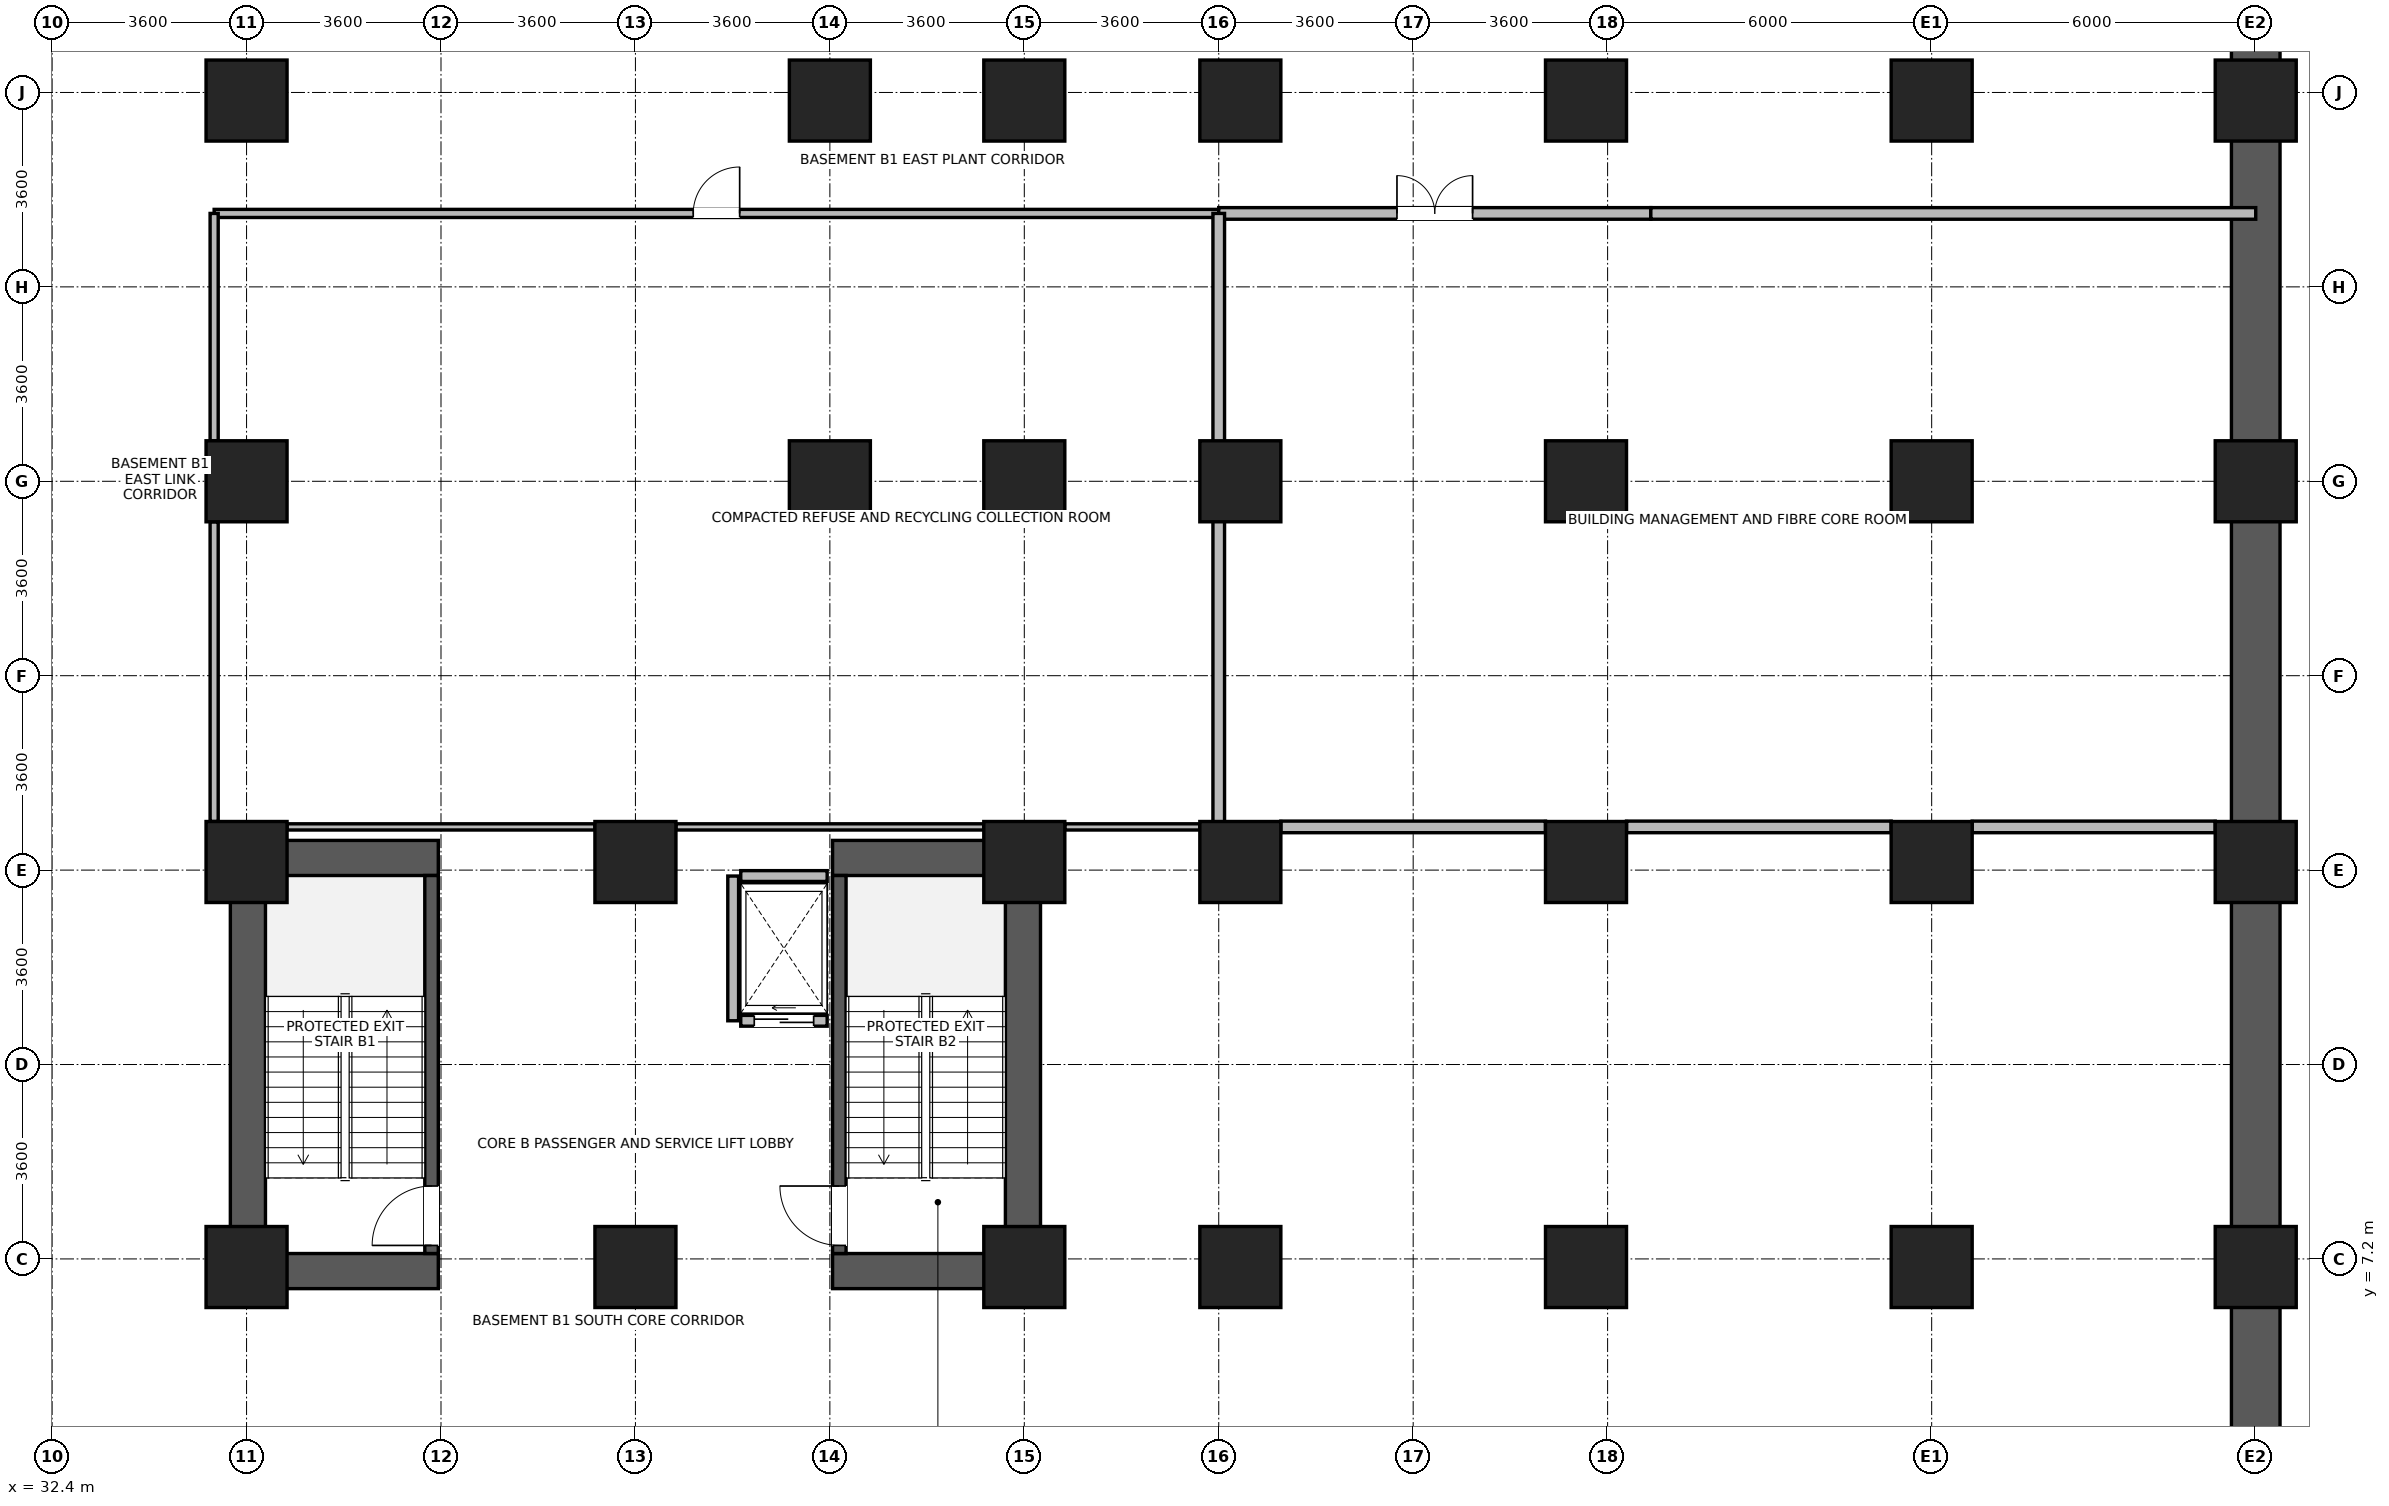
"""IFC4 building model, lengths in metres.
Left out: names, types, materials, properties, quantities, classifications, styles, units other than length and angle.
Written with IfcOpenShell. Run it as: python <this file> out.ifc"""

import sys

from ifc_helpers import new_model, si_unit, direction, frame, frame_2d, origin, origin_2d, place, context, subcontext, project, spatial, rectangle, extrude, source, transform, mapped, element, fill, save


model = new_model("IFC4")
c1 = context("Model", 3, precision=1e-05, world=origin(), true_north=direction((0.0, 1.0)))
c2 = subcontext(c1, "Body", "Model", "MODEL_VIEW")
j1 = project(units=[si_unit("LENGTHUNIT", "METRE"), si_unit("PLANEANGLEUNIT", "RADIAN")], contexts=[c1])
p1 = place(None, origin())
s1 = spatial("IfcSite", under=j1, at=p1, CompositionType="ELEMENT")
p2 = place(p1, origin())
s2 = spatial("IfcBuilding", under=s1, at=p2, CompositionType="ELEMENT")
p3 = place(p2, frame((0.0, 0.0, -4.5)))
s3 = spatial("IfcBuildingStorey", under=s2, at=p3, CompositionType="ELEMENT", Elevation=-4.5)
p4 = place(p3, frame((73.2, 2.25, 0.0), z_axis=(0.0, 0.0, 1.0), x_axis=(0.0, 1.0, 0.0)))
e1 = element("IfcWall", 1, at=p4, inside=s3, PredefinedType="USERDEFINED", context=c2, shape_type="SweptSolid", body=[
    extrude(rectangle(XDim=42.15, YDim=0.9, at=frame_2d((21.075, 0.0))), origin(), (0.0, 0.0, 1.0), 4.15),
])
for number, where, z_axis, x_axis in (
    (2, (36.025, 6.65, 0.0), (0.0, 0.0, 1.0), (0.0, 1.0, 0.0)),
    (3, (50.375, 6.65, 0.0), (0.0, 0.0, 1.0), (0.0, 1.0, 0.0)),
):
    element("IfcWall", number, at=place(p3, frame(where, z_axis=z_axis, x_axis=x_axis)), inside=s3, PredefinedType="SHEAR", context=c2, shape_type="SweptSolid", body=[
        extrude(rectangle(XDim=8.3, YDim=0.65, at=frame_2d((4.15, 0.0))), origin(), (0.0, 0.0, 1.0), 4.15),
    ])
for number, where, z_axis, x_axis in (
    (4, (36.35, 6.975, 0.0), (0.0, 0.0, 1.0), (1.0, 0.0, 0.0)),
    (5, (46.85, 6.975, 0.0), (0.0, 0.0, 1.0), (1.0, 0.0, 0.0)),
    (6, (36.35, 14.625, 0.0), (0.0, 0.0, 1.0), (1.0, 0.0, 0.0)),
    (7, (46.85, 14.625, 0.0), (0.0, 0.0, 1.0), (1.0, 0.0, 0.0)),
):
    element("IfcWall", number, at=place(p3, frame(where, z_axis=z_axis, x_axis=x_axis)), inside=s3, PredefinedType="SHEAR", context=c2, shape_type="SweptSolid", body=[
        extrude(rectangle(XDim=3.2, YDim=0.65, at=frame_2d((1.6, 0.0))), origin(), (0.0, 0.0, 1.0), 4.15),
    ])
p5 = place(p3, frame((39.425, 7.3, 0.0), z_axis=(0.0, 0.0, 1.0), x_axis=(0.0, 1.0, 0.0)))
e8 = element("IfcWall", 8, at=p5, inside=s3, PredefinedType="SHEAR", context=c2, shape_type="SweptSolid", body=[
    extrude(rectangle(XDim=7.0, YDim=0.25, at=frame_2d((3.5, 0.0))), origin(), (0.0, 0.0, 1.0), 4.15),
])
p6 = place(p5, frame((0.15, 0.0, 0.0)))
e9 = element("IfcOpeningElement", 9, at=p6, cuts=e8, PredefinedType="OPENING", context=c2, shape_type="SweptSolid", body=[
    extrude(rectangle(XDim=1.1, YDim=2.08, at=frame_2d((0.55, 1.04))), frame((0.0, 0.135, 0.0), z_axis=(0.0, -1.0, 0.0), x_axis=(1.0, 0.0, 0.0)), (0.0, 0.0, 1.0), 0.27),
])
p7 = place(p3, frame((46.975, 7.3, 0.0), z_axis=(0.0, 0.0, 1.0), x_axis=(0.0, 1.0, 0.0)))
e10 = element("IfcWall", 10, at=p7, inside=s3, PredefinedType="SHEAR", context=c2, shape_type="SweptSolid", body=[
    extrude(rectangle(XDim=7.0, YDim=0.25, at=frame_2d((3.5, 0.0))), origin(), (0.0, 0.0, 1.0), 4.15),
])
p8 = place(p7, frame((0.15, 0.0, 0.0)))
e11 = element("IfcOpeningElement", 11, at=p8, cuts=e10, PredefinedType="OPENING", context=c2, shape_type="SweptSolid", body=[
    extrude(rectangle(XDim=1.1, YDim=2.08, at=frame_2d((0.55, 1.04))), frame((0.0, 0.135, 0.0), z_axis=(0.0, -1.0, 0.0), x_axis=(1.0, 0.0, 0.0)), (0.0, 0.0, 1.0), 0.27),
])
m1 = source(origin(), c2, "Body", "SweptSolid", [
    extrude(rectangle(XDim=1.5, YDim=1.5, at=origin_2d()), origin(), (0.0, 0.0, 1.0), 4.5),
])
for number, where, z_axis, x_axis in (
    (12, (36.0, 21.6, 0.0), (0.0, 0.0, 1.0), (1.0, 0.0, 0.0)),
    (13, (36.0, 28.65, 0.0), (0.0, 0.0, 1.0), (1.0, 0.0, 0.0)),
    (14, (46.8, 21.6, 0.0), (0.0, 0.0, 1.0), (1.0, 0.0, 0.0)),
    (15, (46.8, 28.65, 0.0), (0.0, 0.0, 1.0), (1.0, 0.0, 0.0)),
    (16, (36.0, 7.05, 0.0), (0.0, 0.0, 1.0), (1.0, 0.0, 0.0)),
    (17, (36.0, 14.55, 0.0), (0.0, 0.0, 1.0), (1.0, 0.0, 0.0)),
    (18, (43.2, 7.05, 0.0), (0.0, 0.0, 1.0), (1.0, 0.0, 0.0)),
    (19, (43.2, 14.55, 0.0), (0.0, 0.0, 1.0), (1.0, 0.0, 0.0)),
    (20, (50.4, 7.05, 0.0), (0.0, 0.0, 1.0), (1.0, 0.0, 0.0)),
    (21, (50.4, 14.55, 0.0), (0.0, 0.0, 1.0), (1.0, 0.0, 0.0)),
    (22, (50.4, 21.6, 0.0), (0.0, 0.0, 1.0), (1.0, 0.0, 0.0)),
    (23, (50.4, 28.65, 0.0), (0.0, 0.0, 1.0), (1.0, 0.0, 0.0)),
    (24, (54.4, 7.05, 0.0), (0.0, 0.0, 1.0), (1.0, 0.0, 0.0)),
    (25, (54.4, 14.55, 0.0), (0.0, 0.0, 1.0), (1.0, 0.0, 0.0)),
    (26, (54.4, 21.6, 0.0), (0.0, 0.0, 1.0), (1.0, 0.0, 0.0)),
    (27, (54.4, 28.65, 0.0), (0.0, 0.0, 1.0), (1.0, 0.0, 0.0)),
    (28, (60.8, 28.65, 0.0), (0.0, 0.0, 1.0), (1.0, 0.0, 0.0)),
    (29, (60.8, 21.6, 0.0), (0.0, 0.0, 1.0), (1.0, 0.0, 0.0)),
    (30, (60.8, 14.55, 0.0), (0.0, 0.0, 1.0), (1.0, 0.0, 0.0)),
    (31, (60.8, 7.05, 0.0), (0.0, 0.0, 1.0), (1.0, 0.0, 0.0)),
    (32, (67.2, 7.05, 0.0), (0.0, 0.0, 1.0), (1.0, 0.0, 0.0)),
    (33, (67.2, 14.55, 0.0), (0.0, 0.0, 1.0), (1.0, 0.0, 0.0)),
    (34, (67.2, 21.6, 0.0), (0.0, 0.0, 1.0), (1.0, 0.0, 0.0)),
    (35, (67.2, 28.65, 0.0), (0.0, 0.0, 1.0), (1.0, 0.0, 0.0)),
    (36, (73.2, 7.05, 0.0), (0.0, 0.0, 1.0), (1.0, 0.0, 0.0)),
    (37, (73.2, 14.55, 0.0), (0.0, 0.0, 1.0), (1.0, 0.0, 0.0)),
    (38, (73.2, 21.6, 0.0), (0.0, 0.0, 1.0), (1.0, 0.0, 0.0)),
    (39, (73.2, 28.65, 0.0), (0.0, 0.0, 1.0), (1.0, 0.0, 0.0)),
):
    element("IfcColumn", number, at=place(p3, frame(where, z_axis=z_axis, x_axis=x_axis)), inside=s3, PredefinedType="COLUMN", context=c2, shape_type="MappedRepresentation", body=[
        mapped(m1, transform((0.0, 0.0, 0.0), x_axis=(1.0, 0.0, 0.0), y_axis=(0.0, 1.0, 0.0), z_axis=(0.0, 0.0, 1.0), scale=1.0)),
    ])
p9 = place(p3, frame((45.15, 11.61, 0.0), z_axis=(0.0, 0.0, 1.0), x_axis=(1.0, 0.0, 0.0)))
e40 = element("IfcWall", 40, at=p9, inside=s3, PredefinedType="PARTITIONING", context=c2, shape_type="SweptSolid", body=[
    extrude(rectangle(XDim=1.6, YDim=0.2, at=frame_2d((0.8, 0.0))), origin(), (0.0, 0.0, 1.0), 4.13),
])
p10 = place(p9, frame((0.25, 0.0, 0.0)))
e41 = element("IfcOpeningElement", 41, at=p10, cuts=e40, PredefinedType="OPENING", context=c2, shape_type="SweptSolid", body=[
    extrude(rectangle(XDim=1.1, YDim=2.12, at=frame_2d((0.55, 1.06))), frame((0.0, 0.11, 0.0), z_axis=(0.0, -1.0, 0.0), x_axis=(1.0, 0.0, 0.0)), (0.0, 0.0, 1.0), 0.22),
])
p11 = place(p3, frame((45.15, 14.29, 0.0), z_axis=(0.0, 0.0, 1.0), x_axis=(1.0, 0.0, 0.0)))
e42 = element("IfcWall", 42, at=p11, inside=s3, PredefinedType="PARTITIONING", context=c2, shape_type="SweptSolid", body=[
    extrude(rectangle(XDim=1.6, YDim=0.2, at=frame_2d((0.8, 0.0))), origin(), (0.0, 0.0, 1.0), 2.93),
])
p12 = place(p3, frame((45.01, 11.61, 0.0), z_axis=(0.0, 0.0, 1.0), x_axis=(0.0, 1.0, 0.0)))
e43 = element("IfcWall", 43, at=p12, inside=s3, PredefinedType="PARTITIONING", context=c2, shape_type="SweptSolid", body=[
    extrude(rectangle(XDim=2.68, YDim=0.2, at=frame_2d((1.34, 0.0))), origin(), (0.0, 0.0, 1.0), 4.13),
])
p13 = place(p3, frame((35.4, 26.56, 0.0), z_axis=(0.0, 0.0, 1.0), x_axis=(1.0, 0.0, 0.0)))
e44 = element("IfcWall", 44, at=p13, inside=s3, PredefinedType="PARTITIONING", context=c2, shape_type="SweptSolid", body=[
    extrude(rectangle(XDim=18.6, YDim=0.15, at=frame_2d((9.3, 0.0))), origin(), (0.0, 0.0, 1.0), 4.13),
])
p14 = place(p13, frame((8.87, 0.0, 0.0)))
e45 = element("IfcOpeningElement", 45, at=p14, cuts=e44, PredefinedType="OPENING", context=c2, shape_type="SweptSolid", body=[
    extrude(rectangle(XDim=0.86, YDim=2.02, at=frame_2d((0.43, 1.01))), frame((0.0, 0.085, 0.0), z_axis=(0.0, -1.0, 0.0), x_axis=(1.0, 0.0, 0.0)), (0.0, 0.0, 1.0), 0.17),
])
p15 = place(p3, frame((35.4, 15.3, 0.0), z_axis=(0.0, 0.0, 1.0), x_axis=(0.0, 1.0, 0.0)))
e46 = element("IfcWall", 46, at=p15, inside=s3, PredefinedType="PARTITIONING", context=c2, shape_type="SweptSolid", body=[
    extrude(rectangle(XDim=5.55, YDim=0.15, at=frame_2d((2.775, 0.0))), origin(), (0.0, 0.0, 1.0), 4.13),
])
p16 = place(p3, frame((35.4, 22.35, 0.0), z_axis=(0.0, 0.0, 1.0), x_axis=(0.0, 1.0, 0.0)))
e47 = element("IfcWall", 47, at=p16, inside=s3, PredefinedType="PARTITIONING", context=c2, shape_type="SweptSolid", body=[
    extrude(rectangle(XDim=4.21, YDim=0.15, at=frame_2d((2.105, 0.0))), origin(), (0.0, 0.0, 1.0), 4.13),
])
p17 = place(p3, frame((54.0, 26.56, 0.0), z_axis=(0.0, 0.0, 1.0), x_axis=(1.0, 0.0, 0.0)))
e48 = element("IfcWall", 48, at=p17, inside=s3, PredefinedType="PARTITIONING", context=c2, shape_type="SweptSolid", body=[
    extrude(rectangle(XDim=8.0, YDim=0.215, at=frame_2d((4.0, 0.0))), origin(), (0.0, 0.0, 1.0), 4.13),
])
p18 = place(p17, frame((3.3, 0.0, 0.0)))
e49 = element("IfcOpeningElement", 49, at=p18, cuts=e48, PredefinedType="OPENING", context=c2, shape_type="SweptSolid", body=[
    extrude(rectangle(XDim=1.4, YDim=2.15, at=frame_2d((0.7, 1.075))), frame((0.0, 0.118, 0.0), z_axis=(0.0, -1.0, 0.0), x_axis=(1.0, 0.0, 0.0)), (0.0, 0.0, 1.0), 0.235),
])
p19 = place(p3, frame((55.15, 15.2, 0.0), z_axis=(0.0, 0.0, 1.0), x_axis=(1.0, 0.0, 0.0)))
e50 = element("IfcWall", 50, at=p19, inside=s3, PredefinedType="PARTITIONING", context=c2, shape_type="SweptSolid", body=[
    extrude(rectangle(XDim=4.9, YDim=0.215, at=frame_2d((2.45, 0.0))), origin(), (0.0, 0.0, 1.0), 4.13),
])
p20 = place(p3, frame((61.55, 15.2, 0.0), z_axis=(0.0, 0.0, 1.0), x_axis=(1.0, 0.0, 0.0)))
e51 = element("IfcWall", 51, at=p20, inside=s3, PredefinedType="PARTITIONING", context=c2, shape_type="SweptSolid", body=[
    extrude(rectangle(XDim=4.9, YDim=0.215, at=frame_2d((2.45, 0.0))), origin(), (0.0, 0.0, 1.0), 4.13),
])
p21 = place(p3, frame((67.95, 15.2, 0.0), z_axis=(0.0, 0.0, 1.0), x_axis=(1.0, 0.0, 0.0)))
e52 = element("IfcWall", 52, at=p21, inside=s3, PredefinedType="PARTITIONING", context=c2, shape_type="SweptSolid", body=[
    extrude(rectangle(XDim=4.5, YDim=0.215, at=frame_2d((2.25, 0.0))), origin(), (0.0, 0.0, 1.0), 4.13),
])
for number, where, z_axis, x_axis in (
    (53, (36.75, 15.2, 0.0), (0.0, 0.0, 1.0), (1.0, 0.0, 0.0)),
    (54, (43.95, 15.2, 0.0), (0.0, 0.0, 1.0), (1.0, 0.0, 0.0)),
):
    element("IfcWall", number, at=place(p3, frame(where, z_axis=z_axis, x_axis=x_axis)), inside=s3, PredefinedType="PARTITIONING", context=c2, shape_type="SweptSolid", body=[
        extrude(rectangle(XDim=5.7, YDim=0.115, at=frame_2d((2.85, 0.0))), origin(), (0.0, 0.0, 1.0), 4.13),
    ])
p22 = place(p3, frame((51.15, 15.2, 0.0), z_axis=(0.0, 0.0, 1.0), x_axis=(1.0, 0.0, 0.0)))
e55 = element("IfcWall", 55, at=p22, inside=s3, PredefinedType="PARTITIONING", context=c2, shape_type="SweptSolid", body=[
    extrude(rectangle(XDim=2.5, YDim=0.115, at=frame_2d((1.25, 0.0))), origin(), (0.0, 0.0, 1.0), 4.13),
])
p23 = place(p3, frame((54.0, 15.2, 0.0), z_axis=(0.0, 0.0, 1.0), x_axis=(0.0, 1.0, 0.0)))
e56 = element("IfcWall", 56, at=p23, inside=s3, PredefinedType="PARTITIONING", context=c2, shape_type="SweptSolid", body=[
    extrude(rectangle(XDim=11.36, YDim=0.215, at=frame_2d((5.68, 0.0))), origin(), (0.0, 0.0, 1.0), 4.13),
])
p24 = place(p3, frame((62.0, 26.56, 0.0), z_axis=(0.0, 0.0, 1.0), x_axis=(1.0, 0.0, 0.0)))
e57 = element("IfcWall", 57, at=p24, inside=s3, PredefinedType="PARTITIONING", context=c2, shape_type="SweptSolid", body=[
    extrude(rectangle(XDim=11.2, YDim=0.215, at=frame_2d((5.6, 0.0))), origin(), (0.0, 0.0, 1.0), 4.13),
])
p25 = place(p6, origin())
e58 = element("IfcDoor", 58, at=p25, inside=s3, OperationType="SINGLE_SWING_LEFT", PredefinedType="DOOR", context=c2, shape_type="SweptSolid", body=[
    extrude(rectangle(XDim=1.1, YDim=2.08, at=frame_2d((0.55, 1.04))), frame((0.0, 0.025, 0.0), z_axis=(0.0, -1.0, 0.0), x_axis=(1.0, 0.0, 0.0)), (0.0, 0.0, 1.0), 0.05),
])
fill(e9, e58)
p26 = place(p8, origin())
e59 = element("IfcDoor", 59, at=p26, inside=s3, OperationType="SINGLE_SWING_RIGHT", PredefinedType="DOOR", context=c2, shape_type="SweptSolid", body=[
    extrude(rectangle(XDim=1.1, YDim=2.08, at=frame_2d((0.55, 1.04))), frame((0.0, 0.025, 0.0), z_axis=(0.0, -1.0, 0.0), x_axis=(1.0, 0.0, 0.0)), (0.0, 0.0, 1.0), 0.05),
])
fill(e11, e59)
p27 = place(p10, origin())
e60 = element("IfcDoor", 60, at=p27, inside=s3, OperationType="SLIDING_TO_LEFT", PredefinedType="DOOR", context=c2, shape_type="SweptSolid", body=[
    extrude(rectangle(XDim=1.1, YDim=2.12, at=frame_2d((0.55, 1.06))), frame((0.0, 0.025, 0.0), z_axis=(0.0, -1.0, 0.0), x_axis=(1.0, 0.0, 0.0)), (0.0, 0.0, 1.0), 0.05),
])
fill(e41, e60)
p28 = place(p14, origin())
e61 = element("IfcDoor", 61, at=p28, inside=s3, OperationType="SINGLE_SWING_RIGHT", PredefinedType="DOOR", context=c2, shape_type="SweptSolid", body=[
    extrude(rectangle(XDim=0.86, YDim=2.02, at=frame_2d((0.43, 1.01))), frame((0.0, 0.025, 0.0), z_axis=(0.0, -1.0, 0.0), x_axis=(1.0, 0.0, 0.0)), (0.0, 0.0, 1.0), 0.05),
])
fill(e45, e61)
p29 = place(p18, origin())
e62 = element("IfcDoor", 62, at=p29, inside=s3, OperationType="DOUBLE_DOOR_SINGLE_SWING", PredefinedType="DOOR", context=c2, shape_type="SweptSolid", body=[
    extrude(rectangle(XDim=1.4, YDim=2.15, at=frame_2d((0.7, 1.075))), frame((0.0, 0.025, 0.0), z_axis=(0.0, -1.0, 0.0), x_axis=(1.0, 0.0, 0.0)), (0.0, 0.0, 1.0), 0.05),
])
fill(e49, e62)
save(model, sys.argv[1])
